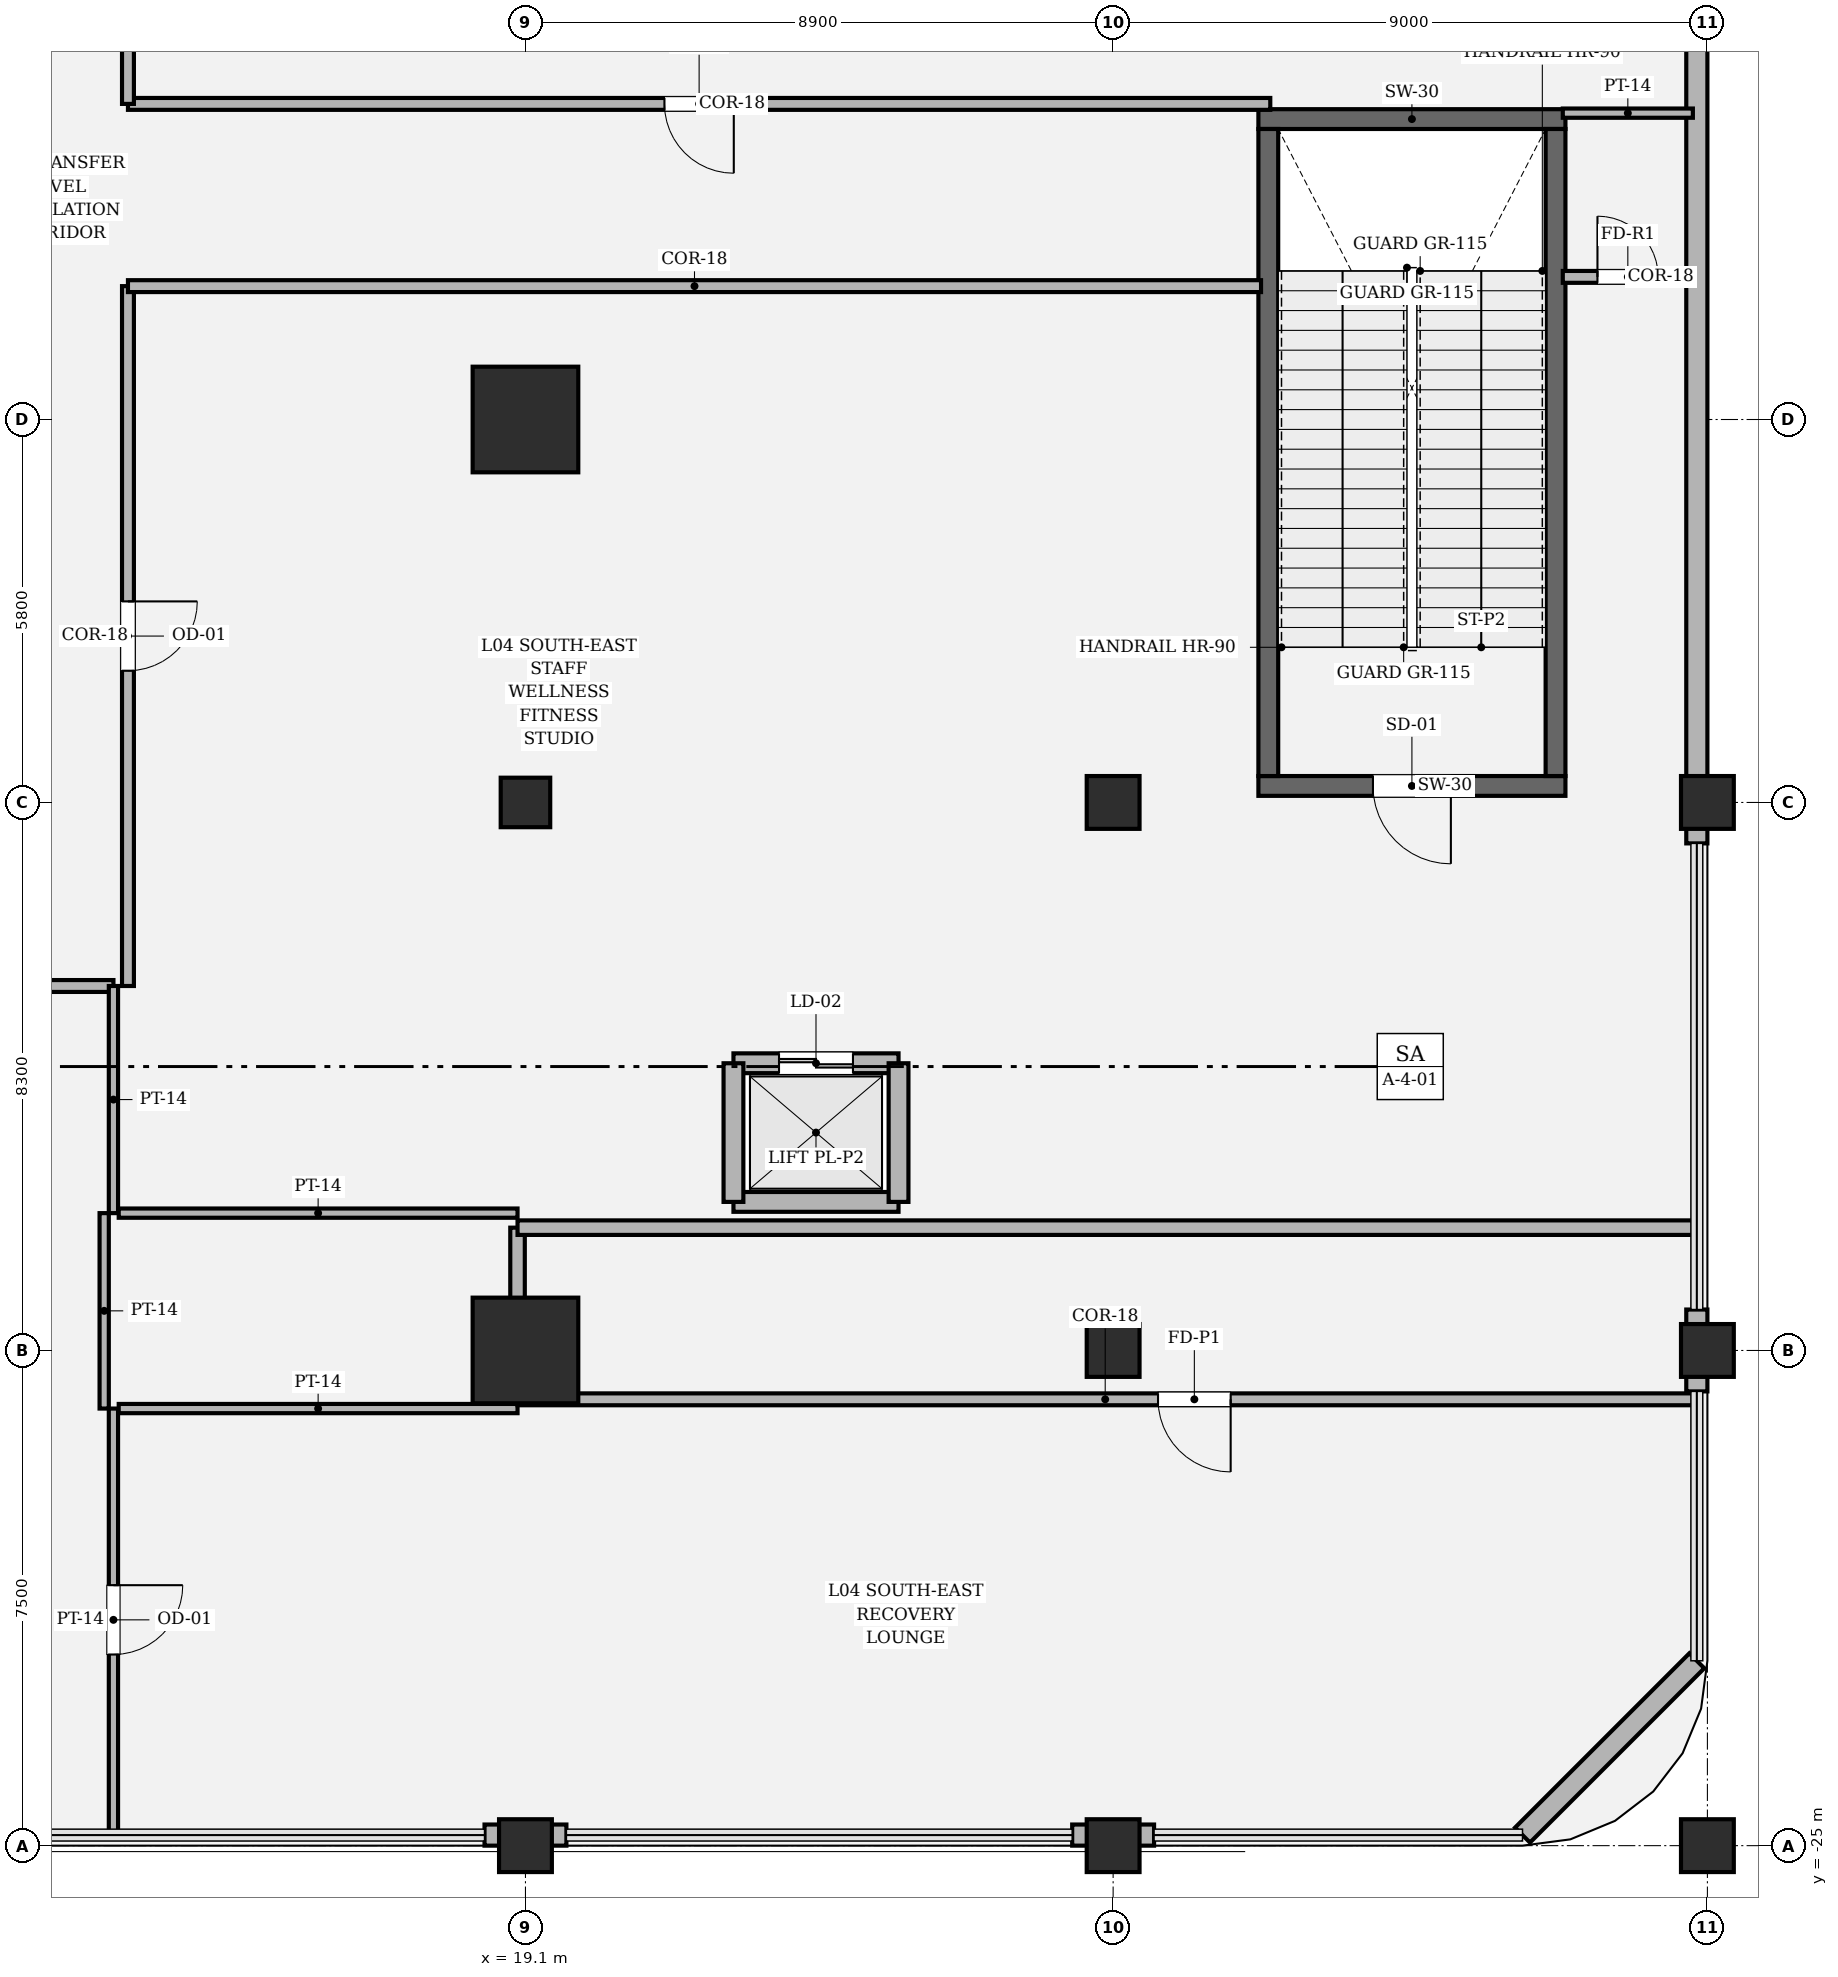
"""IFC4 building model, lengths in metres.
Left out: names, types, materials, properties, quantities, classifications, styles, units other than length and angle.
Written with IfcOpenShell. Run it as: python <this file> out.ifc"""

import sys

from ifc_helpers import new_model, si_unit, direction, frame, frame_2d, origin, origin_2d, place, context, subcontext, project, spatial, rectangle, hollow_rectangle, circle, extrude, element, fill, save


model = new_model("IFC4")
c1 = context("Model", 3, precision=1e-05, world=origin(), true_north=direction((0.0, 1.0)))
c2 = subcontext(c1, "Body", "Model", "MODEL_VIEW")
j1 = project(units=[si_unit("LENGTHUNIT", "METRE"), si_unit("PLANEANGLEUNIT", "RADIAN")], contexts=[c1])
p1 = place(None, origin())
s1 = spatial("IfcSite", under=j1, at=p1, CompositionType="ELEMENT")
p2 = place(p1, origin())
s2 = spatial("IfcBuilding", under=s1, at=p2, CompositionType="ELEMENT")
p3 = place(p2, frame((0.0, 0.0, 22.2)))
s3 = spatial("IfcBuildingStorey", under=s2, at=p3, CompositionType="ELEMENT", Elevation=22.2)
p4 = place(p3, frame((30.2, -8.95, 0.0), z_axis=(0.0, 0.0, 1.0), x_axis=(1.0, 0.0, 0.0)))
e1 = element("IfcWall", 1, at=p4, inside=s3, PredefinedType="SOLIDWALL", context=c2, shape_type="SweptSolid", body=[
    extrude(rectangle(XDim=4.65, YDim=0.3, at=frame_2d((2.325, 0.0))), origin(), (0.0, 0.0, 1.0), 6.0),
])
p5 = place(p4, frame((1.735, 0.0, 0.0)))
e2 = element("IfcOpeningElement", 2, at=p5, cuts=e1, PredefinedType="OPENING", context=c2, shape_type="SweptSolid", body=[
    extrude(rectangle(XDim=1.18, YDim=2.2, at=frame_2d((0.59, 1.1))), frame((0.0, 0.16, 0.0), z_axis=(0.0, -1.0, 0.0), x_axis=(1.0, 0.0, 0.0)), (0.0, 0.0, 1.0), 0.32),
])
p6 = place(p3, frame((34.85, 1.15, 0.0), z_axis=(0.0, 0.0, 1.0), x_axis=(-1.0, 0.0, 0.0)))
e3 = element("IfcWall", 3, at=p6, inside=s3, PredefinedType="SOLIDWALL", context=c2, shape_type="SweptSolid", body=[
    extrude(rectangle(XDim=4.65, YDim=0.3, at=frame_2d((2.325, 0.0))), origin(), (0.0, 0.0, 1.0), 6.0),
])
for number, where, z_axis, x_axis in (
    (4, (30.35, -8.8, 0.0), (0.0, 0.0, 1.0), (0.0, 1.0, 0.0)),
    (5, (34.7, 1.0, 0.0), (0.0, 0.0, 1.0), (0.0, -1.0, 0.0)),
):
    element("IfcWall", number, at=place(p3, frame(where, z_axis=z_axis, x_axis=x_axis)), inside=s3, PredefinedType="SOLIDWALL", context=c2, shape_type="SweptSolid", body=[
        extrude(rectangle(XDim=9.8, YDim=0.3, at=frame_2d((4.9, 0.0))), origin(), (0.0, 0.0, 1.0), 6.0),
    ])
for number, where, z_axis, x_axis in (
    (6, (19.1, -17.5, 0.0), (0.0, 0.0, 1.0), (1.0, 0.0, 0.0)),
    (7, (19.1, -3.4, 0.0), (0.0, 0.0, 1.0), (1.0, 0.0, 0.0)),
):
    element("IfcColumn", number, at=place(p3, frame(where, z_axis=z_axis, x_axis=x_axis)), inside=s3, PredefinedType="COLUMN", context=c2, shape_type="SweptSolid", body=[
        extrude(hollow_rectangle(XDim=1.6, YDim=1.6, WallThickness=0.05, at=origin_2d()), origin(), (0.0, 0.0, 1.0), 6.0),
    ])
for number, where, z_axis, x_axis in (
    (8, (19.1, -25.0, 0.0), (0.0, 0.0, 1.0), (1.0, 0.0, 0.0)),
    (9, (28.0, -25.0, 0.0), (0.0, 0.0, 1.0), (1.0, 0.0, 0.0)),
    (10, (37.0, -25.0, 0.0), (0.0, 0.0, 1.0), (1.0, 0.0, 0.0)),
    (11, (28.0, -17.5, 0.0), (0.0, 0.0, 1.0), (1.0, 0.0, 0.0)),
    (12, (37.0, -17.5, 0.0), (0.0, 0.0, 1.0), (1.0, 0.0, 0.0)),
    (13, (37.0, -9.2, 0.0), (0.0, 0.0, 1.0), (1.0, 0.0, 0.0)),
    (14, (28.0, -9.2, 0.0), (0.0, 0.0, 1.0), (1.0, 0.0, 0.0)),
):
    element("IfcColumn", number, at=place(p3, frame(where, z_axis=z_axis, x_axis=x_axis)), inside=s3, PredefinedType="COLUMN", context=c2, shape_type="SweptSolid", body=[
        extrude(rectangle(XDim=0.8, YDim=0.8, at=origin_2d()), origin(), (0.0, 0.0, 1.0), 6.0),
    ])
p7 = place(p3, frame((19.1, -9.2, 0.0), z_axis=(0.0, 0.0, 1.0), x_axis=(1.0, 0.0, 0.0)))
e15 = element("IfcColumn", 15, at=p7, inside=s3, PredefinedType="PILASTER", context=c2, shape_type="SweptSolid", body=[
    extrude(circle(Radius=0.375, at=origin_2d()), origin(), (0.0, 0.0, 1.0), 6.0),
])
p8 = place(p3, frame((18.48, -24.84, 0.0), z_axis=(0.0, 0.0, 1.0), x_axis=(1.0, 0.0, 0.0)))
e16 = element("IfcWall", 16, at=p8, inside=s3, PredefinedType="SOLIDWALL", context=c2, shape_type="SweptSolid", body=[
    extrude(rectangle(XDim=1.24, YDim=0.32, at=frame_2d((0.62, 0.0))), origin(), (0.0, 0.0, 1.0), 4.394),
])
p9 = place(p3, frame((27.38, -24.84, 0.0), z_axis=(0.0, 0.0, 1.0), x_axis=(1.0, 0.0, 0.0)))
e17 = element("IfcWall", 17, at=p9, inside=s3, PredefinedType="SOLIDWALL", context=c2, shape_type="SweptSolid", body=[
    extrude(rectangle(XDim=1.24, YDim=0.32, at=frame_2d((0.62, 0.0))), origin(), (0.0, 0.0, 1.0), 4.394),
])
p10 = place(p3, frame((36.84, 9.82, 0.0), z_axis=(0.0, 0.0, 1.0), x_axis=(0.0, -1.0, 0.0)))
e18 = element("IfcWall", 18, at=p10, inside=s3, PredefinedType="SOLIDWALL", context=c2, shape_type="SweptSolid", body=[
    extrude(rectangle(XDim=19.64, YDim=0.32, at=frame_2d((9.82, 0.0))), origin(), (0.0, 0.0, 1.0), 5.014),
])
p11 = place(p3, frame((36.84, -16.88, 0.0), z_axis=(0.0, 0.0, 1.0), x_axis=(0.0, -1.0, 0.0)))
e19 = element("IfcWall", 19, at=p11, inside=s3, PredefinedType="SOLIDWALL", context=c2, shape_type="SweptSolid", body=[
    extrude(rectangle(XDim=1.24, YDim=0.32, at=frame_2d((0.62, 0.0))), origin(), (0.0, 0.0, 1.0), 5.014),
])
p12 = place(p3, frame((36.84, -22.2, 0.0), z_axis=(0.0, 0.0, 1.0), x_axis=(-0.707106781187, -0.707106781187, 0.0)))
e20 = element("IfcWall", 20, at=p12, inside=s3, PredefinedType="SOLIDWALL", context=c2, shape_type="SweptSolid", body=[
    extrude(rectangle(XDim=3.734, YDim=0.32, at=frame_2d((1.867, 0.0))), origin(), (0.0, 0.0, 1.0), 5.014),
])
p13 = place(p3, frame((22.25, -13.15, 0.0), z_axis=(0.0, 0.0, 1.0), x_axis=(1.0, 0.0, 0.0)))
e21 = element("IfcWall", 21, at=p13, inside=s3, PredefinedType="SOLIDWALL", context=c2, shape_type="SweptSolid", body=[
    extrude(rectangle(XDim=2.5, YDim=0.3, at=frame_2d((1.25, 0.0))), origin(), (0.0, 0.0, 1.0), 5.72),
])
p14 = place(p13, frame((0.69, 0.0, 0.0)))
e22 = element("IfcOpeningElement", 22, at=p14, cuts=e21, PredefinedType="OPENING", context=c2, shape_type="SweptSolid", body=[
    extrude(rectangle(XDim=1.12, YDim=2.25, at=frame_2d((0.56, 1.125))), frame((0.0, 0.16, 0.0), z_axis=(0.0, -1.0, 0.0), x_axis=(1.0, 0.0, 0.0)), (0.0, 0.0, 1.0), 0.32),
])
p15 = place(p3, frame((22.25, -15.25, 0.0), z_axis=(0.0, 0.0, 1.0), x_axis=(1.0, 0.0, 0.0)))
e23 = element("IfcWall", 23, at=p15, inside=s3, PredefinedType="SOLIDWALL", context=c2, shape_type="SweptSolid", body=[
    extrude(rectangle(XDim=2.5, YDim=0.3, at=frame_2d((1.25, 0.0))), origin(), (0.0, 0.0, 1.0), 5.72),
])
for number, where, z_axis, x_axis in (
    (24, (22.25, -15.25, 0.0), (0.0, 0.0, 1.0), (0.0, 1.0, 0.0)),
    (25, (24.75, -15.25, 0.0), (0.0, 0.0, 1.0), (0.0, 1.0, 0.0)),
):
    element("IfcWall", number, at=place(p3, frame(where, z_axis=z_axis, x_axis=x_axis)), inside=s3, PredefinedType="SOLIDWALL", context=c2, shape_type="SweptSolid", body=[
        extrude(rectangle(XDim=2.1, YDim=0.3, at=frame_2d((1.05, 0.0))), origin(), (0.0, 0.0, 1.0), 5.72),
    ])
p16 = place(p3, frame((-12.86, -11.98, 0.0), z_axis=(0.0, 0.0, 1.0), x_axis=(1.0, 0.0, 0.0)))
e26 = element("IfcWall", 26, at=p16, inside=s3, PredefinedType="PARTITIONING", context=c2, shape_type="SweptSolid", body=[
    extrude(rectangle(XDim=25.72, YDim=0.18, at=frame_2d((12.86, 0.0))), origin(), (0.0, 0.0, 1.0), 4.394),
])
p17 = place(p16, frame((12.335, 0.0, 0.0)))
e27 = element("IfcOpeningElement", 27, at=p17, cuts=e26, PredefinedType="OPENING", context=c2, shape_type="SweptSolid", body=[
    extrude(rectangle(XDim=1.05, YDim=2.2, at=frame_2d((0.525, 1.1))), frame((0.0, 0.1, 0.0), z_axis=(0.0, -1.0, 0.0), x_axis=(1.0, 0.0, 0.0)), (0.0, 0.0, 1.0), 0.2),
])
p18 = place(p3, frame((12.86, -11.98, 0.0), z_axis=(0.0, 0.0, 1.0), x_axis=(0.0, -1.0, 0.0)))
e28 = element("IfcWall", 28, at=p18, inside=s3, PredefinedType="PARTITIONING", context=c2, shape_type="SweptSolid", body=[
    extrude(rectangle(XDim=3.44, YDim=0.14, at=frame_2d((1.72, 0.0))), origin(), (0.0, 0.0, 1.0), 5.264),
])
p19 = place(p3, frame((12.72, -15.42, 0.0), z_axis=(0.0, 0.0, 1.0), x_axis=(0.0, -1.0, 0.0)))
e29 = element("IfcWall", 29, at=p19, inside=s3, PredefinedType="PARTITIONING", context=c2, shape_type="SweptSolid", body=[
    extrude(rectangle(XDim=2.96, YDim=0.14, at=frame_2d((1.48, 0.0))), origin(), (0.0, 0.0, 1.0), 4.394),
])
p20 = place(p3, frame((12.86, -18.38, 0.0), z_axis=(0.0, 0.0, 1.0), x_axis=(0.0, -1.0, 0.0)))
e30 = element("IfcWall", 30, at=p20, inside=s3, PredefinedType="PARTITIONING", context=c2, shape_type="SweptSolid", body=[
    extrude(rectangle(XDim=6.4, YDim=0.14, at=frame_2d((3.2, 0.0))), origin(), (0.0, 0.0, 1.0), 4.394),
])
p21 = place(p20, frame((2.675, 0.0, 0.0)))
e31 = element("IfcOpeningElement", 31, at=p21, cuts=e30, PredefinedType="OPENING", context=c2, shape_type="SweptSolid", body=[
    extrude(rectangle(XDim=1.05, YDim=2.2, at=frame_2d((0.525, 1.1))), frame((0.0, 0.08, 0.0), z_axis=(0.0, -1.0, 0.0), x_axis=(1.0, 0.0, 0.0)), (0.0, 0.0, 1.0), 0.16),
])
p22 = place(p3, frame((18.98, -15.42, 0.0), z_axis=(0.0, 0.0, 1.0), x_axis=(-1.0, 0.0, 0.0)))
e32 = element("IfcWall", 32, at=p22, inside=s3, PredefinedType="PARTITIONING", context=c2, shape_type="SweptSolid", body=[
    extrude(rectangle(XDim=6.04, YDim=0.14, at=frame_2d((3.02, 0.0))), origin(), (0.0, 0.0, 1.0), 4.394),
])
p23 = place(p3, frame((13.08, -11.98, 0.0), z_axis=(0.0, 0.0, 1.0), x_axis=(0.0, 1.0, 0.0)))
e33 = element("IfcWall", 33, at=p23, inside=s3, PredefinedType="PARTITIONING", context=c2, shape_type="SweptSolid", body=[
    extrude(rectangle(XDim=10.6, YDim=0.18, at=frame_2d((5.3, 0.0))), origin(), (0.0, 0.0, 1.0), 4.394),
])
p24 = place(p23, frame((4.775, 0.0, 0.0)))
e34 = element("IfcOpeningElement", 34, at=p24, cuts=e33, PredefinedType="OPENING", context=c2, shape_type="SweptSolid", body=[
    extrude(rectangle(XDim=1.05, YDim=2.2, at=frame_2d((0.525, 1.1))), frame((0.0, 0.1, 0.0), z_axis=(0.0, -1.0, 0.0), x_axis=(1.0, 0.0, 0.0)), (0.0, 0.0, 1.0), 0.2),
])
p25 = place(p3, frame((13.08, -1.38, 0.0), z_axis=(0.0, 0.0, 1.0), x_axis=(1.0, 0.0, 0.0)))
e35 = element("IfcWall", 35, at=p25, inside=s3, PredefinedType="PARTITIONING", context=c2, shape_type="SweptSolid", body=[
    extrude(rectangle(XDim=17.16, YDim=0.18, at=frame_2d((8.58, 0.0))), origin(), (0.0, 0.0, 1.0), 4.394),
])
p26 = place(p3, frame((34.81, -1.24, 0.0), z_axis=(0.0, 0.0, 1.0), x_axis=(1.0, 0.0, 0.0)))
e36 = element("IfcWall", 36, at=p26, inside=s3, PredefinedType="PARTITIONING", context=c2, shape_type="SweptSolid", body=[
    extrude(rectangle(XDim=1.97, YDim=0.18, at=frame_2d((0.985, 0.0))), origin(), (0.0, 0.0, 1.0), 5.72),
])
p27 = place(p26, frame((0.525, 0.0, 0.0)))
e37 = element("IfcOpeningElement", 37, at=p27, cuts=e36, PredefinedType="OPENING", context=c2, shape_type="SweptSolid", body=[
    extrude(rectangle(XDim=0.92, YDim=2.1, at=frame_2d((0.46, 1.05))), frame((0.0, 0.1, 0.0), z_axis=(0.0, -1.0, 0.0), x_axis=(1.0, 0.0, 0.0)), (0.0, 0.0, 1.0), 0.2),
])
p28 = place(p3, frame((12.94, -18.38, 0.0), z_axis=(0.0, 0.0, 1.0), x_axis=(1.0, 0.0, 0.0)))
e38 = element("IfcWall", 38, at=p28, inside=s3, PredefinedType="PARTITIONING", context=c2, shape_type="SweptSolid", body=[
    extrude(rectangle(XDim=6.04, YDim=0.14, at=frame_2d((3.02, 0.0))), origin(), (0.0, 0.0, 1.0), 4.394),
])
p29 = place(p3, frame((18.98, -18.24, 0.0), z_axis=(0.0, 0.0, 1.0), x_axis=(1.0, 0.0, 0.0)))
e39 = element("IfcWall", 39, at=p29, inside=s3, PredefinedType="PARTITIONING", context=c2, shape_type="SweptSolid", body=[
    extrude(rectangle(XDim=17.8, YDim=0.18, at=frame_2d((8.9, 0.0))), origin(), (0.0, 0.0, 1.0), 4.394),
])
p30 = place(p29, frame((9.7, 0.0, 0.0)))
e40 = element("IfcOpeningElement", 40, at=p30, cuts=e39, PredefinedType="OPENING", context=c2, shape_type="SweptSolid", body=[
    extrude(rectangle(XDim=1.1, YDim=2.2, at=frame_2d((0.55, 1.1))), frame((0.0, 0.1, 0.0), z_axis=(0.0, -1.0, 0.0), x_axis=(1.0, 0.0, 0.0)), (0.0, 0.0, 1.0), 0.2),
])
p31 = place(p3, frame((18.98, -18.16, 0.0), z_axis=(0.0, 0.0, 1.0), x_axis=(0.0, 1.0, 0.0)))
e41 = element("IfcWall", 41, at=p31, inside=s3, PredefinedType="SOLIDWALL", context=c2, shape_type="SweptSolid", body=[
    extrude(rectangle(XDim=2.52, YDim=0.22, at=frame_2d((1.26, 0.0))), origin(), (0.0, 0.0, 1.0), 4.394),
])
p32 = place(p3, frame((18.98, -15.64, 0.0), z_axis=(0.0, 0.0, 1.0), x_axis=(1.0, 0.0, 0.0)))
e42 = element("IfcWall", 42, at=p32, inside=s3, PredefinedType="SOLIDWALL", context=c2, shape_type="SweptSolid", body=[
    extrude(rectangle(XDim=17.8, YDim=0.22, at=frame_2d((8.9, 0.0))), origin(), (0.0, 0.0, 1.0), 4.394),
])
p33 = place(p3, frame((36.78, 1.24, 0.0), z_axis=(0.0, 0.0, 1.0), x_axis=(-1.0, 0.0, 0.0)))
e43 = element("IfcWall", 43, at=p33, inside=s3, PredefinedType="PARTITIONING", context=c2, shape_type="SweptSolid", body=[
    extrude(rectangle(XDim=1.97, YDim=0.14, at=frame_2d((0.985, 0.0))), origin(), (0.0, 0.0, 1.0), 5.72),
])
p34 = place(p3, frame((30.38, 1.38, 0.0), z_axis=(0.0, 0.0, 1.0), x_axis=(-1.0, 0.0, 0.0)))
e44 = element("IfcWall", 44, at=p34, inside=s3, PredefinedType="PARTITIONING", context=c2, shape_type="SweptSolid", body=[
    extrude(rectangle(XDim=17.3, YDim=0.18, at=frame_2d((8.65, 0.0))), origin(), (0.0, 0.0, 1.0), 4.394),
])
p35 = place(p34, frame((8.125, 0.0, 0.0)))
e45 = element("IfcOpeningElement", 45, at=p35, cuts=e44, PredefinedType="OPENING", context=c2, shape_type="SweptSolid", body=[
    extrude(rectangle(XDim=1.05, YDim=2.2, at=frame_2d((0.525, 1.1))), frame((0.0, 0.1, 0.0), z_axis=(0.0, -1.0, 0.0), x_axis=(1.0, 0.0, 0.0)), (0.0, 0.0, 1.0), 0.2),
])
p36 = place(p3, frame((13.08, 1.38, 0.0), z_axis=(0.0, 0.0, 1.0), x_axis=(0.0, 1.0, 0.0)))
e46 = element("IfcWall", 46, at=p36, inside=s3, PredefinedType="PARTITIONING", context=c2, shape_type="SweptSolid", body=[
    extrude(rectangle(XDim=10.6, YDim=0.18, at=frame_2d((5.3, 0.0))), origin(), (0.0, 0.0, 1.0), 4.394),
])
p37 = place(p5, origin())
e47 = element("IfcDoor", 47, at=p37, inside=s3, OperationType="SINGLE_SWING_RIGHT", PredefinedType="DOOR", context=c2, shape_type="SweptSolid", body=[
    extrude(rectangle(XDim=1.18, YDim=2.2, at=frame_2d((0.59, 1.1))), frame((0.0, 0.025, 0.0), z_axis=(0.0, -1.0, 0.0), x_axis=(1.0, 0.0, 0.0)), (0.0, 0.0, 1.0), 0.05),
])
fill(e2, e47)
p38 = place(p14, origin())
e48 = element("IfcDoor", 48, at=p38, inside=s3, OperationType="DOUBLE_DOOR_SLIDING", PredefinedType="DOOR", context=c2, shape_type="SweptSolid", body=[
    extrude(rectangle(XDim=1.12, YDim=2.25, at=frame_2d((0.56, 1.125))), frame((0.0, 0.025, 0.0), z_axis=(0.0, -1.0, 0.0), x_axis=(1.0, 0.0, 0.0)), (0.0, 0.0, 1.0), 0.05),
])
fill(e22, e48)
p39 = place(p24, origin())
e49 = element("IfcDoor", 49, at=p39, inside=s3, OperationType="SINGLE_SWING_RIGHT", PredefinedType="DOOR", context=c2, shape_type="SweptSolid", body=[
    extrude(rectangle(XDim=1.05, YDim=2.2, at=frame_2d((0.525, 1.1))), frame((0.0, 0.025, 0.0), z_axis=(0.0, -1.0, 0.0), x_axis=(1.0, 0.0, 0.0)), (0.0, 0.0, 1.0), 0.05),
])
fill(e34, e49)
p40 = place(p21, origin())
e50 = element("IfcDoor", 50, at=p40, inside=s3, OperationType="SINGLE_SWING_LEFT", PredefinedType="DOOR", context=c2, shape_type="SweptSolid", body=[
    extrude(rectangle(XDim=1.05, YDim=2.2, at=frame_2d((0.525, 1.1))), frame((0.0, 0.025, 0.0), z_axis=(0.0, -1.0, 0.0), x_axis=(1.0, 0.0, 0.0)), (0.0, 0.0, 1.0), 0.05),
])
fill(e31, e50)
p41 = place(p30, origin())
e51 = element("IfcDoor", 51, at=p41, inside=s3, OperationType="SINGLE_SWING_RIGHT", PredefinedType="DOOR", context=c2, shape_type="SweptSolid", body=[
    extrude(rectangle(XDim=1.1, YDim=2.2, at=frame_2d((0.55, 1.1))), frame((0.0, 0.025, 0.0), z_axis=(0.0, -1.0, 0.0), x_axis=(1.0, 0.0, 0.0)), (0.0, 0.0, 1.0), 0.05),
])
fill(e40, e51)
p42 = place(p35, origin())
e52 = element("IfcDoor", 52, at=p42, inside=s3, OperationType="SINGLE_SWING_LEFT", PredefinedType="DOOR", context=c2, shape_type="SweptSolid", body=[
    extrude(rectangle(XDim=1.05, YDim=2.2, at=frame_2d((0.525, 1.1))), frame((0.0, 0.025, 0.0), z_axis=(0.0, -1.0, 0.0), x_axis=(1.0, 0.0, 0.0)), (0.0, 0.0, 1.0), 0.05),
])
fill(e45, e52)
p43 = place(p27, origin())
e53 = element("IfcDoor", 53, at=p43, inside=s3, OperationType="SINGLE_SWING_LEFT", PredefinedType="DOOR", context=c2, shape_type="SweptSolid", body=[
    extrude(rectangle(XDim=0.92, YDim=2.1, at=frame_2d((0.46, 1.05))), frame((0.0, 0.025, 0.0), z_axis=(0.0, -1.0, 0.0), x_axis=(1.0, 0.0, 0.0)), (0.0, 0.0, 1.0), 0.05),
])
fill(e37, e53)
save(model, sys.argv[1])
